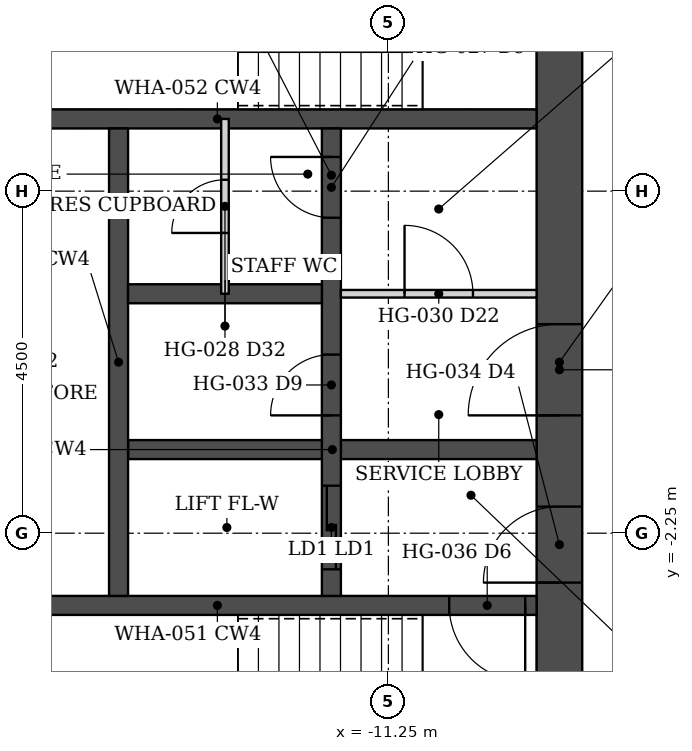
"""IFC4 building model, lengths in metres.
Left out: names, types, materials, properties, quantities, classifications, styles, units other than length and angle.
Written with IfcOpenShell. Run it as: python <this file> out.ifc"""

import sys

from ifc_helpers import new_model, si_unit, direction, frame, frame_2d, origin, place, context, subcontext, project, spatial, rectangle, extrude, element, fill, save


model = new_model("IFC4")
c1 = context("Model", 3, precision=1e-05, world=origin(), true_north=direction((0.0, 1.0)))
c2 = subcontext(c1, "Body", "Model", "MODEL_VIEW")
j1 = project(units=[si_unit("LENGTHUNIT", "METRE"), si_unit("PLANEANGLEUNIT", "RADIAN")], contexts=[c1])
p1 = place(None, origin())
s1 = spatial("IfcSite", under=j1, at=p1, CompositionType="ELEMENT")
p2 = place(p1, origin())
s2 = spatial("IfcBuilding", under=s1, at=p2, CompositionType="ELEMENT")
p3 = place(p2, frame((0.0, 0.0, 183.2)))
s3 = spatial("IfcBuildingStorey", under=s2, at=p3, CompositionType="ELEMENT", Elevation=183.2)
p4 = place(p3, frame((-9.0, -6.45, 0.0), z_axis=(0.0, 0.0, 1.0), x_axis=(0.0, 1.0, 0.0)))
e1 = element("IfcWall", 1, at=p4, inside=s3, PredefinedType="SHEAR", context=c2, shape_type="SweptSolid", body=[
    extrude(rectangle(XDim=12.9, YDim=0.6, at=frame_2d((6.45, 0.0))), origin(), (0.0, 0.0, 1.0), 3.6),
])
p5 = place(p4, frame((3.55, 0.0, 0.0)))
e2 = element("IfcOpeningElement", 2, at=p5, cuts=e1, PredefinedType="OPENING", context=c2, shape_type="SweptSolid", body=[
    extrude(rectangle(XDim=1.0, YDim=2.1, at=frame_2d((0.5, 1.05))), frame((0.0, 0.31, 0.0), z_axis=(0.0, -1.0, 0.0), x_axis=(1.0, 0.0, 0.0)), (0.0, 0.0, 1.0), 0.62),
])
p6 = place(p4, frame((5.75, 0.0, 0.0)))
e3 = element("IfcOpeningElement", 3, at=p6, cuts=e1, PredefinedType="OPENING", context=c2, shape_type="SweptSolid", body=[
    extrude(rectangle(XDim=1.2, YDim=2.1, at=frame_2d((0.6, 1.05))), frame((0.0, 0.31, 0.0), z_axis=(0.0, -1.0, 0.0), x_axis=(1.0, 0.0, 0.0)), (0.0, 0.0, 1.0), 0.62),
])
p7 = place(p4, frame((10.85, 0.0, 0.0)))
e4 = element("IfcOpeningElement", 4, at=p7, cuts=e1, PredefinedType="OPENING", context=c2, shape_type="SweptSolid", body=[
    extrude(rectangle(XDim=1.0, YDim=2.1, at=frame_2d((0.5, 1.05))), frame((0.0, 0.31, 0.0), z_axis=(0.0, -1.0, 0.0), x_axis=(1.0, 0.0, 0.0)), (0.0, 0.0, 1.0), 0.62),
])
p8 = place(p3, frame((-9.3, -3.2, 0.0), z_axis=(0.0, 0.0, 1.0), x_axis=(-1.0, 0.0, 0.0)))
e5 = element("IfcWall", 5, at=p8, inside=s3, PredefinedType="SHEAR", context=c2, shape_type="SweptSolid", body=[
    extrude(rectangle(XDim=8.4, YDim=0.25, at=frame_2d((4.2, 0.0))), origin(), (0.0, 0.0, 1.0), 3.6),
])
p9 = place(p8, frame((0.15, 0.0, 0.0)))
e6 = element("IfcOpeningElement", 6, at=p9, cuts=e5, PredefinedType="OPENING", context=c2, shape_type="SweptSolid", body=[
    extrude(rectangle(XDim=1.0, YDim=2.1, at=frame_2d((0.5, 1.05))), frame((0.0, 0.135, 0.0), z_axis=(0.0, -1.0, 0.0), x_axis=(1.0, 0.0, 0.0)), (0.0, 0.0, 1.0), 0.27),
])
p10 = place(p3, frame((-9.3, 3.2, 0.0), z_axis=(0.0, 0.0, 1.0), x_axis=(-1.0, 0.0, 0.0)))
e7 = element("IfcWall", 7, at=p10, inside=s3, PredefinedType="SHEAR", context=c2, shape_type="SweptSolid", body=[
    extrude(rectangle(XDim=8.4, YDim=0.25, at=frame_2d((4.2, 0.0))), origin(), (0.0, 0.0, 1.0), 3.6),
])
p11 = place(p3, frame((-9.3, -1.15, 0.0), z_axis=(0.0, 0.0, 1.0), x_axis=(-1.0, 0.0, 0.0)))
e8 = element("IfcWall", 8, at=p11, inside=s3, PredefinedType="SHEAR", context=c2, shape_type="SweptSolid", body=[
    extrude(rectangle(XDim=5.375, YDim=0.25, at=frame_2d((2.688, 0.0))), origin(), (0.0, 0.0, 1.0), 3.6),
])
p12 = place(p3, frame((-12.0, -3.075, 0.0), z_axis=(0.0, 0.0, 1.0), x_axis=(0.0, 1.0, 0.0)))
e9 = element("IfcWall", 9, at=p12, inside=s3, PredefinedType="SHEAR", context=c2, shape_type="SweptSolid", body=[
    extrude(rectangle(XDim=6.15, YDim=0.25, at=frame_2d((3.075, 0.0))), origin(), (0.0, 0.0, 1.0), 3.6),
])
p13 = place(p12, frame((2.375, 0.0, 0.0)))
e10 = element("IfcOpeningElement", 10, at=p13, cuts=e9, PredefinedType="OPENING", context=c2, shape_type="SweptSolid", body=[
    extrude(rectangle(XDim=0.8, YDim=2.1, at=frame_2d((0.4, 1.05))), frame((0.0, 0.135, 0.0), z_axis=(0.0, -1.0, 0.0), x_axis=(1.0, 0.0, 0.0)), (0.0, 0.0, 1.0), 0.27),
])
p14 = place(p12, frame((4.975, 0.0, 0.0)))
e11 = element("IfcOpeningElement", 11, at=p14, cuts=e9, PredefinedType="OPENING", context=c2, shape_type="SweptSolid", body=[
    extrude(rectangle(XDim=0.8, YDim=2.1, at=frame_2d((0.4, 1.05))), frame((0.0, 0.135, 0.0), z_axis=(0.0, -1.0, 0.0), x_axis=(1.0, 0.0, 0.0)), (0.0, 0.0, 1.0), 0.27),
])
p15 = place(p12, frame((0.35, 0.0, 0.0)))
e12 = element("IfcOpeningElement", 12, at=p15, cuts=e9, PredefinedType="OPENING", context=c2, shape_type="SweptSolid", body=[
    extrude(rectangle(XDim=1.1, YDim=2.1, at=frame_2d((0.55, 1.05))), frame((0.0, 0.135, 0.0), z_axis=(0.0, -1.0, 0.0), x_axis=(1.0, 0.0, 0.0)), (0.0, 0.0, 1.0), 0.27),
])
p16 = place(p3, frame((-14.8, -3.075, 0.0), z_axis=(0.0, 0.0, 1.0), x_axis=(0.0, 1.0, 0.0)))
e13 = element("IfcWall", 13, at=p16, inside=s3, PredefinedType="SHEAR", context=c2, shape_type="SweptSolid", body=[
    extrude(rectangle(XDim=6.15, YDim=0.25, at=frame_2d((3.075, 0.0))), origin(), (0.0, 0.0, 1.0), 3.6),
])
p17 = place(p3, frame((-12.125, 0.9, 0.0), z_axis=(0.0, 0.0, 1.0), x_axis=(-1.0, 0.0, 0.0)))
e14 = element("IfcWall", 14, at=p17, inside=s3, PredefinedType="SHEAR", context=c2, shape_type="SweptSolid", body=[
    extrude(rectangle(XDim=2.55, YDim=0.25, at=frame_2d((1.275, 0.0))), origin(), (0.0, 0.0, 1.0), 3.6),
])
p18 = place(p3, frame((-11.875, 0.9, 0.0), z_axis=(0.0, 0.0, 1.0), x_axis=(1.0, 0.0, 0.0)))
e15 = element("IfcWall", 15, at=p18, inside=s3, PredefinedType="PARTITIONING", context=c2, shape_type="SweptSolid", body=[
    extrude(rectangle(XDim=2.575, YDim=0.1, at=frame_2d((1.288, 0.0))), origin(), (0.0, 0.0, 1.0), 2.473),
])
p19 = place(p18, frame((0.837, 0.0, 0.0)))
e16 = element("IfcOpeningElement", 16, at=p19, cuts=e15, PredefinedType="OPENING", context=c2, shape_type="SweptSolid", body=[
    extrude(rectangle(XDim=0.9, YDim=2.1, at=frame_2d((0.45, 1.05))), frame((0.0, 0.06, 0.0), z_axis=(0.0, -1.0, 0.0), x_axis=(1.0, 0.0, 0.0)), (0.0, 0.0, 1.0), 0.12),
])
p20 = place(p3, frame((-13.4, 0.9, 0.0), z_axis=(0.0, 0.0, 1.0), x_axis=(0.0, 1.0, 0.0)))
e17 = element("IfcWall", 17, at=p20, inside=s3, PredefinedType="PARTITIONING", context=c2, shape_type="SweptSolid", body=[
    extrude(rectangle(XDim=2.3, YDim=0.1, at=frame_2d((1.15, 0.0))), origin(), (0.0, 0.0, 1.0), 2.473),
])
p21 = place(p20, frame((0.8, 0.0, 0.0)))
e18 = element("IfcOpeningElement", 18, at=p21, cuts=e17, PredefinedType="OPENING", context=c2, shape_type="SweptSolid", body=[
    extrude(rectangle(XDim=0.7, YDim=2.1, at=frame_2d((0.35, 1.05))), frame((0.0, 0.06, 0.0), z_axis=(0.0, -1.0, 0.0), x_axis=(1.0, 0.0, 0.0)), (0.0, 0.0, 1.0), 0.12),
])
p22 = place(p5, origin())
e19 = element("IfcDoor", 19, at=p22, inside=s3, OperationType="SINGLE_SWING_LEFT", PredefinedType="DOOR", context=c2, shape_type="SweptSolid", body=[
    extrude(rectangle(XDim=1.0, YDim=2.1, at=frame_2d((0.5, 1.05))), frame((0.0, 0.025, 0.0), z_axis=(0.0, -1.0, 0.0), x_axis=(1.0, 0.0, 0.0)), (0.0, 0.0, 1.0), 0.05),
])
fill(e2, e19)
p23 = place(p9, origin())
e20 = element("IfcDoor", 20, at=p23, inside=s3, OperationType="SINGLE_SWING_LEFT", PredefinedType="DOOR", context=c2, shape_type="SweptSolid", body=[
    extrude(rectangle(XDim=1.0, YDim=2.1, at=frame_2d((0.5, 1.05))), frame((0.0, 0.025, 0.0), z_axis=(0.0, -1.0, 0.0), x_axis=(1.0, 0.0, 0.0)), (0.0, 0.0, 1.0), 0.05),
])
fill(e6, e20)
p24 = place(p19, origin())
e21 = element("IfcDoor", 21, at=p24, inside=s3, OperationType="SINGLE_SWING_LEFT", PredefinedType="DOOR", context=c2, shape_type="SweptSolid", body=[
    extrude(rectangle(XDim=0.9, YDim=2.1, at=frame_2d((0.45, 1.05))), frame((0.0, 0.025, 0.0), z_axis=(0.0, -1.0, 0.0), x_axis=(1.0, 0.0, 0.0)), (0.0, 0.0, 1.0), 0.05),
])
fill(e16, e21)
p25 = place(p6, origin())
e22 = element("IfcDoor", 22, at=p25, inside=s3, OperationType="SINGLE_SWING_LEFT", PredefinedType="DOOR", context=c2, shape_type="SweptSolid", body=[
    extrude(rectangle(XDim=1.2, YDim=2.1, at=frame_2d((0.6, 1.05))), frame((0.0, 0.025, 0.0), z_axis=(0.0, -1.0, 0.0), x_axis=(1.0, 0.0, 0.0)), (0.0, 0.0, 1.0), 0.05),
])
fill(e3, e22)
p26 = place(p13, origin())
e23 = element("IfcDoor", 23, at=p26, inside=s3, OperationType="SINGLE_SWING_LEFT", PredefinedType="DOOR", context=c2, shape_type="SweptSolid", body=[
    extrude(rectangle(XDim=0.8, YDim=2.1, at=frame_2d((0.4, 1.05))), frame((0.0, 0.025, 0.0), z_axis=(0.0, -1.0, 0.0), x_axis=(1.0, 0.0, 0.0)), (0.0, 0.0, 1.0), 0.05),
])
fill(e10, e23)
p27 = place(p21, origin())
e24 = element("IfcDoor", 24, at=p27, inside=s3, OperationType="SINGLE_SWING_LEFT", PredefinedType="DOOR", context=c2, shape_type="SweptSolid", body=[
    extrude(rectangle(XDim=0.7, YDim=2.1, at=frame_2d((0.35, 1.05))), frame((0.0, 0.025, 0.0), z_axis=(0.0, -1.0, 0.0), x_axis=(1.0, 0.0, 0.0)), (0.0, 0.0, 1.0), 0.05),
])
fill(e18, e24)
p28 = place(p14, origin())
e25 = element("IfcDoor", 25, at=p28, inside=s3, OperationType="SINGLE_SWING_RIGHT", PredefinedType="DOOR", context=c2, shape_type="SweptSolid", body=[
    extrude(rectangle(XDim=0.8, YDim=2.1, at=frame_2d((0.4, 1.05))), frame((0.0, 0.025, 0.0), z_axis=(0.0, -1.0, 0.0), x_axis=(1.0, 0.0, 0.0)), (0.0, 0.0, 1.0), 0.05),
])
fill(e11, e25)
p29 = place(p15, origin())
e26 = element("IfcDoor", 26, at=p29, inside=s3, OperationType="DOUBLE_DOOR_SLIDING", PredefinedType="DOOR", context=c2, shape_type="SweptSolid", body=[
    extrude(rectangle(XDim=1.1, YDim=2.1, at=frame_2d((0.55, 1.05))), frame((0.0, 0.025, 0.0), z_axis=(0.0, -1.0, 0.0), x_axis=(1.0, 0.0, 0.0)), (0.0, 0.0, 1.0), 0.05),
])
fill(e12, e26)
save(model, sys.argv[1])
